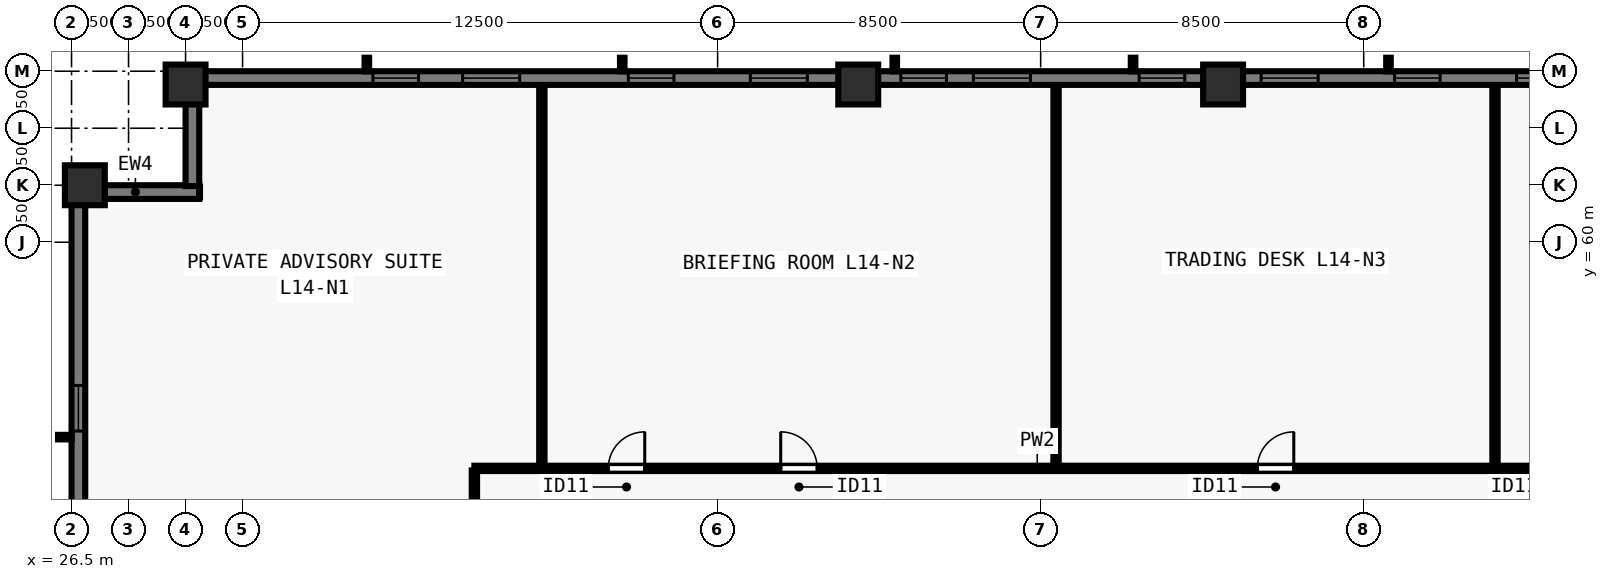
"""IFC4 building model, lengths in metres.
Left out: names, types, materials, properties, quantities, classifications, styles, units other than length and angle.
Written with IfcOpenShell. Run it as: python <this file> out.ifc"""

import sys

from ifc_helpers import new_model, si_unit, direction, frame, frame_2d, origin, origin_2d, place, context, subcontext, project, spatial, rectangle, extrude, element, fill, save


model = new_model("IFC4")
c1 = context("Model", 3, precision=1e-05, world=origin(), true_north=direction((0.0, 1.0)))
c2 = subcontext(c1, "Body", "Model", "MODEL_VIEW")
j1 = project(units=[si_unit("LENGTHUNIT", "METRE"), si_unit("PLANEANGLEUNIT", "RADIAN")], contexts=[c1])
p1 = place(None, origin())
s1 = spatial("IfcSite", under=j1, at=p1, CompositionType="ELEMENT")
p2 = place(p1, origin())
s2 = spatial("IfcBuilding", under=s1, at=p2, CompositionType="ELEMENT")
p3 = place(p2, frame((0.0, 0.0, 55.0)))
s3 = spatial("IfcBuildingStorey", under=s2, at=p3, CompositionType="ELEMENT", Elevation=55.0)
for number, where, z_axis, x_axis in (
    (1, (56.8, 64.15, 0.0), (0.0, 0.0, 1.0), (1.0, 0.0, 0.0)),
    (2, (47.2, 64.15, 0.0), (0.0, 0.0, 1.0), (1.0, 0.0, 0.0)),
    (3, (29.5, 64.15, 0.0), (0.0, 0.0, 1.0), (1.0, 0.0, 0.0)),
    (4, (26.85, 61.5, 0.0), (0.0, 0.0, 1.0), (0.0, 1.0, 0.0)),
):
    element("IfcColumn", number, at=place(p3, frame(where, z_axis=z_axis, x_axis=x_axis)), inside=s3, PredefinedType="COLUMN", context=c2, shape_type="SweptSolid", body=[
        extrude(rectangle(XDim=1.05, YDim=1.05, at=origin_2d()), origin(), (0.0, 0.0, 1.0), 3.5),
    ])
p4 = place(p3, frame((26.68, 16.5, 0.0), z_axis=(0.0, 0.0, 1.0), x_axis=(0.0, 1.0, 0.0)))
e5 = element("IfcWall", 5, at=p4, inside=s3, PredefinedType="SOLIDWALL", context=c2, shape_type="SweptSolid", body=[
    extrude(rectangle(XDim=44.662, YDim=0.36, at=frame_2d((22.331, 0.0))), origin(), (0.0, 0.0, 1.0), 3.28),
])
p5 = place(p4, frame((4.93, 0.0, 0.8)))
e6 = element("IfcOpeningElement", 6, at=p5, cuts=e5, PredefinedType="OPENING", context=c2, shape_type="SweptSolid", body=[
    extrude(rectangle(XDim=1.2, YDim=1.544, at=frame_2d((0.6, 0.772))), frame((0.0, 0.19, 0.0), z_axis=(0.0, -1.0, 0.0), x_axis=(1.0, 0.0, 0.0)), (0.0, 0.0, 1.0), 0.38),
])
p6 = place(p4, frame((8.14, 0.0, 0.8)))
e7 = element("IfcOpeningElement", 7, at=p6, cuts=e5, PredefinedType="OPENING", context=c2, shape_type="SweptSolid", body=[
    extrude(rectangle(XDim=1.5, YDim=1.544, at=frame_2d((0.75, 0.772))), frame((0.0, 0.19, 0.0), z_axis=(0.0, -1.0, 0.0), x_axis=(1.0, 0.0, 0.0)), (0.0, 0.0, 1.0), 0.38),
])
p7 = place(p4, frame((11.65, 0.0, 0.8)))
e8 = element("IfcOpeningElement", 8, at=p7, cuts=e5, PredefinedType="OPENING", context=c2, shape_type="SweptSolid", body=[
    extrude(rectangle(XDim=1.2, YDim=1.544, at=frame_2d((0.6, 0.772))), frame((0.0, 0.19, 0.0), z_axis=(0.0, -1.0, 0.0), x_axis=(1.0, 0.0, 0.0)), (0.0, 0.0, 1.0), 0.38),
])
p8 = place(p4, frame((14.861, 0.0, 0.8)))
e9 = element("IfcOpeningElement", 9, at=p8, cuts=e5, PredefinedType="OPENING", context=c2, shape_type="SweptSolid", body=[
    extrude(rectangle(XDim=1.5, YDim=1.544, at=frame_2d((0.75, 0.772))), frame((0.0, 0.19, 0.0), z_axis=(0.0, -1.0, 0.0), x_axis=(1.0, 0.0, 0.0)), (0.0, 0.0, 1.0), 0.38),
])
p9 = place(p4, frame((19.621, 0.0, 0.8)))
e10 = element("IfcOpeningElement", 10, at=p9, cuts=e5, PredefinedType="OPENING", context=c2, shape_type="SweptSolid", body=[
    extrude(rectangle(XDim=1.2, YDim=1.544, at=frame_2d((0.6, 0.772))), frame((0.0, 0.19, 0.0), z_axis=(0.0, -1.0, 0.0), x_axis=(1.0, 0.0, 0.0)), (0.0, 0.0, 1.0), 0.38),
])
p10 = place(p4, frame((21.581, 0.0, 0.8)))
e11 = element("IfcOpeningElement", 11, at=p10, cuts=e5, PredefinedType="OPENING", context=c2, shape_type="SweptSolid", body=[
    extrude(rectangle(XDim=1.5, YDim=1.544, at=frame_2d((0.75, 0.772))), frame((0.0, 0.19, 0.0), z_axis=(0.0, -1.0, 0.0), x_axis=(1.0, 0.0, 0.0)), (0.0, 0.0, 1.0), 0.38),
])
p11 = place(p4, frame((24.241, 0.0, 0.8)))
e12 = element("IfcOpeningElement", 12, at=p11, cuts=e5, PredefinedType="OPENING", context=c2, shape_type="SweptSolid", body=[
    extrude(rectangle(XDim=1.2, YDim=1.544, at=frame_2d((0.6, 0.772))), frame((0.0, 0.19, 0.0), z_axis=(0.0, -1.0, 0.0), x_axis=(1.0, 0.0, 0.0)), (0.0, 0.0, 1.0), 0.38),
])
p12 = place(p4, frame((28.302, 0.0, 0.8)))
e13 = element("IfcOpeningElement", 13, at=p12, cuts=e5, PredefinedType="OPENING", context=c2, shape_type="SweptSolid", body=[
    extrude(rectangle(XDim=1.5, YDim=1.544, at=frame_2d((0.75, 0.772))), frame((0.0, 0.19, 0.0), z_axis=(0.0, -1.0, 0.0), x_axis=(1.0, 0.0, 0.0)), (0.0, 0.0, 1.0), 0.38),
])
p13 = place(p4, frame((31.812, 0.0, 0.8)))
e14 = element("IfcOpeningElement", 14, at=p13, cuts=e5, PredefinedType="OPENING", context=c2, shape_type="SweptSolid", body=[
    extrude(rectangle(XDim=1.2, YDim=1.544, at=frame_2d((0.6, 0.772))), frame((0.0, 0.19, 0.0), z_axis=(0.0, -1.0, 0.0), x_axis=(1.0, 0.0, 0.0)), (0.0, 0.0, 1.0), 0.38),
])
p14 = place(p4, frame((35.022, 0.0, 0.8)))
e15 = element("IfcOpeningElement", 15, at=p14, cuts=e5, PredefinedType="OPENING", context=c2, shape_type="SweptSolid", body=[
    extrude(rectangle(XDim=1.5, YDim=1.544, at=frame_2d((0.75, 0.772))), frame((0.0, 0.19, 0.0), z_axis=(0.0, -1.0, 0.0), x_axis=(1.0, 0.0, 0.0)), (0.0, 0.0, 1.0), 0.38),
])
p15 = place(p4, frame((38.532, 0.0, 0.8)))
e16 = element("IfcOpeningElement", 16, at=p15, cuts=e5, PredefinedType="OPENING", context=c2, shape_type="SweptSolid", body=[
    extrude(rectangle(XDim=1.2, YDim=1.544, at=frame_2d((0.6, 0.772))), frame((0.0, 0.19, 0.0), z_axis=(0.0, -1.0, 0.0), x_axis=(1.0, 0.0, 0.0)), (0.0, 0.0, 1.0), 0.38),
])
p16 = place(p3, frame((26.5, 61.32, 0.0), z_axis=(0.0, 0.0, 1.0), x_axis=(1.0, 0.0, 0.0)))
e17 = element("IfcWall", 17, at=p16, inside=s3, PredefinedType="SOLIDWALL", context=c2, shape_type="SweptSolid", body=[
    extrude(rectangle(XDim=3.36, YDim=0.36, at=frame_2d((1.68, 0.0))), origin(), (0.0, 0.0, 1.0), 3.28),
])
p17 = place(p3, frame((29.68, 61.478, 0.0), z_axis=(0.0, 0.0, 1.0), x_axis=(0.0, 1.0, 0.0)))
e18 = element("IfcWall", 18, at=p17, inside=s3, PredefinedType="SOLIDWALL", context=c2, shape_type="SweptSolid", body=[
    extrude(rectangle(XDim=2.684, YDim=0.36, at=frame_2d((1.342, 0.0))), origin(), (0.0, 0.0, 1.0), 3.28),
])
p18 = place(p3, frame((29.5, 64.32, 0.0), z_axis=(0.0, 0.0, 1.0), x_axis=(1.0, 0.0, 0.0)))
e19 = element("IfcWall", 19, at=p18, inside=s3, PredefinedType="SOLIDWALL", context=c2, shape_type="SweptSolid", body=[
    extrude(rectangle(XDim=44.662, YDim=0.36, at=frame_2d((22.331, 0.0))), origin(), (0.0, 0.0, 1.0), 3.28),
])
p19 = place(p18, frame((4.93, 0.0, 0.8)))
e20 = element("IfcOpeningElement", 20, at=p19, cuts=e19, PredefinedType="OPENING", context=c2, shape_type="SweptSolid", body=[
    extrude(rectangle(XDim=1.2, YDim=1.544, at=frame_2d((0.6, 0.772))), frame((0.0, 0.19, 0.0), z_axis=(0.0, -1.0, 0.0), x_axis=(1.0, 0.0, 0.0)), (0.0, 0.0, 1.0), 0.38),
])
p20 = place(p18, frame((7.29, 0.0, 0.8)))
e21 = element("IfcOpeningElement", 21, at=p20, cuts=e19, PredefinedType="OPENING", context=c2, shape_type="SweptSolid", body=[
    extrude(rectangle(XDim=1.5, YDim=1.544, at=frame_2d((0.75, 0.772))), frame((0.0, 0.19, 0.0), z_axis=(0.0, -1.0, 0.0), x_axis=(1.0, 0.0, 0.0)), (0.0, 0.0, 1.0), 0.38),
])
p21 = place(p18, frame((11.65, 0.0, 0.8)))
e22 = element("IfcOpeningElement", 22, at=p21, cuts=e19, PredefinedType="OPENING", context=c2, shape_type="SweptSolid", body=[
    extrude(rectangle(XDim=1.2, YDim=1.544, at=frame_2d((0.6, 0.772))), frame((0.0, 0.19, 0.0), z_axis=(0.0, -1.0, 0.0), x_axis=(1.0, 0.0, 0.0)), (0.0, 0.0, 1.0), 0.38),
])
p22 = place(p18, frame((14.861, 0.0, 0.8)))
e23 = element("IfcOpeningElement", 23, at=p22, cuts=e19, PredefinedType="OPENING", context=c2, shape_type="SweptSolid", body=[
    extrude(rectangle(XDim=1.5, YDim=1.544, at=frame_2d((0.75, 0.772))), frame((0.0, 0.19, 0.0), z_axis=(0.0, -1.0, 0.0), x_axis=(1.0, 0.0, 0.0)), (0.0, 0.0, 1.0), 0.38),
])
p23 = place(p18, frame((18.821, 0.0, 0.8)))
e24 = element("IfcOpeningElement", 24, at=p23, cuts=e19, PredefinedType="OPENING", context=c2, shape_type="SweptSolid", body=[
    extrude(rectangle(XDim=1.2, YDim=1.544, at=frame_2d((0.6, 0.772))), frame((0.0, 0.19, 0.0), z_axis=(0.0, -1.0, 0.0), x_axis=(1.0, 0.0, 0.0)), (0.0, 0.0, 1.0), 0.38),
])
p24 = place(p18, frame((20.731, 0.0, 0.8)))
e25 = element("IfcOpeningElement", 25, at=p24, cuts=e19, PredefinedType="OPENING", context=c2, shape_type="SweptSolid", body=[
    extrude(rectangle(XDim=1.5, YDim=1.544, at=frame_2d((0.75, 0.772))), frame((0.0, 0.19, 0.0), z_axis=(0.0, -1.0, 0.0), x_axis=(1.0, 0.0, 0.0)), (0.0, 0.0, 1.0), 0.38),
])
p25 = place(p18, frame((25.091, 0.0, 0.8)))
e26 = element("IfcOpeningElement", 26, at=p25, cuts=e19, PredefinedType="OPENING", context=c2, shape_type="SweptSolid", body=[
    extrude(rectangle(XDim=1.2, YDim=1.544, at=frame_2d((0.6, 0.772))), frame((0.0, 0.19, 0.0), z_axis=(0.0, -1.0, 0.0), x_axis=(1.0, 0.0, 0.0)), (0.0, 0.0, 1.0), 0.38),
])
p26 = place(p18, frame((28.302, 0.0, 0.8)))
e27 = element("IfcOpeningElement", 27, at=p26, cuts=e19, PredefinedType="OPENING", context=c2, shape_type="SweptSolid", body=[
    extrude(rectangle(XDim=1.5, YDim=1.544, at=frame_2d((0.75, 0.772))), frame((0.0, 0.19, 0.0), z_axis=(0.0, -1.0, 0.0), x_axis=(1.0, 0.0, 0.0)), (0.0, 0.0, 1.0), 0.38),
])
p27 = place(p18, frame((31.812, 0.0, 0.8)))
e28 = element("IfcOpeningElement", 28, at=p27, cuts=e19, PredefinedType="OPENING", context=c2, shape_type="SweptSolid", body=[
    extrude(rectangle(XDim=1.2, YDim=1.544, at=frame_2d((0.6, 0.772))), frame((0.0, 0.19, 0.0), z_axis=(0.0, -1.0, 0.0), x_axis=(1.0, 0.0, 0.0)), (0.0, 0.0, 1.0), 0.38),
])
p28 = place(p18, frame((35.022, 0.0, 0.8)))
e29 = element("IfcOpeningElement", 29, at=p28, cuts=e19, PredefinedType="OPENING", context=c2, shape_type="SweptSolid", body=[
    extrude(rectangle(XDim=1.5, YDim=1.544, at=frame_2d((0.75, 0.772))), frame((0.0, 0.19, 0.0), z_axis=(0.0, -1.0, 0.0), x_axis=(1.0, 0.0, 0.0)), (0.0, 0.0, 1.0), 0.38),
])
p29 = place(p18, frame((38.532, 0.0, 0.8)))
e30 = element("IfcOpeningElement", 30, at=p29, cuts=e19, PredefinedType="OPENING", context=c2, shape_type="SweptSolid", body=[
    extrude(rectangle(XDim=1.2, YDim=1.544, at=frame_2d((0.6, 0.772))), frame((0.0, 0.19, 0.0), z_axis=(0.0, -1.0, 0.0), x_axis=(1.0, 0.0, 0.0)), (0.0, 0.0, 1.0), 0.38),
])
p30 = place(p3, frame((37.1, 54.05, 0.0), z_axis=(0.0, 0.0, 1.0), x_axis=(1.0, 0.0, 0.0)))
e31 = element("IfcWall", 31, at=p30, inside=s3, PredefinedType="PARTITIONING", context=c2, shape_type="SweptSolid", body=[
    extrude(rectangle(XDim=29.8, YDim=0.14, at=frame_2d((14.9, 0.0))), origin(), (0.0, 0.0, 1.0), 3.28),
])
p31 = place(p30, frame((3.522, 0.0, 0.0)))
e32 = element("IfcOpeningElement", 32, at=p31, cuts=e31, PredefinedType="OPENING", context=c2, shape_type="SweptSolid", body=[
    extrude(rectangle(XDim=0.96, YDim=2.12, at=frame_2d((0.48, 1.06))), frame((0.0, 0.08, 0.0), z_axis=(0.0, -1.0, 0.0), x_axis=(1.0, 0.0, 0.0)), (0.0, 0.0, 1.0), 0.16),
])
p32 = place(p30, frame((8.06, 0.0, 0.0)))
e33 = element("IfcOpeningElement", 33, at=p32, cuts=e31, PredefinedType="OPENING", context=c2, shape_type="SweptSolid", body=[
    extrude(rectangle(XDim=0.96, YDim=2.12, at=frame_2d((0.48, 1.06))), frame((0.0, 0.08, 0.0), z_axis=(0.0, -1.0, 0.0), x_axis=(1.0, 0.0, 0.0)), (0.0, 0.0, 1.0), 0.16),
])
p33 = place(p30, frame((20.6, 0.0, 0.0)))
e34 = element("IfcOpeningElement", 34, at=p33, cuts=e31, PredefinedType="OPENING", context=c2, shape_type="SweptSolid", body=[
    extrude(rectangle(XDim=0.96, YDim=2.12, at=frame_2d((0.48, 1.06))), frame((0.0, 0.08, 0.0), z_axis=(0.0, -1.0, 0.0), x_axis=(1.0, 0.0, 0.0)), (0.0, 0.0, 1.0), 0.16),
])
p34 = place(p30, frame((28.48, 0.0, 0.0)))
e35 = element("IfcOpeningElement", 35, at=p34, cuts=e31, PredefinedType="OPENING", context=c2, shape_type="SweptSolid", body=[
    extrude(rectangle(XDim=0.96, YDim=2.12, at=frame_2d((0.48, 1.06))), frame((0.0, 0.08, 0.0), z_axis=(0.0, -1.0, 0.0), x_axis=(1.0, 0.0, 0.0)), (0.0, 0.0, 1.0), 0.16),
])
p35 = place(p3, frame((37.1, 24.005, 0.0), z_axis=(0.0, 0.0, 1.0), x_axis=(0.0, 1.0, 0.0)))
e36 = element("IfcWall", 36, at=p35, inside=s3, PredefinedType="PARTITIONING", context=c2, shape_type="SweptSolid", body=[
    extrude(rectangle(XDim=29.99, YDim=0.14, at=frame_2d((14.995, 0.0))), origin(), (0.0, 0.0, 1.0), 3.28),
])
p36 = place(p35, frame((2.76, 0.0, 0.0)))
e37 = element("IfcOpeningElement", 37, at=p36, cuts=e36, PredefinedType="OPENING", context=c2, shape_type="SweptSolid", body=[
    extrude(rectangle(XDim=0.96, YDim=2.12, at=frame_2d((0.48, 1.06))), frame((0.0, 0.08, 0.0), z_axis=(0.0, -1.0, 0.0), x_axis=(1.0, 0.0, 0.0)), (0.0, 0.0, 1.0), 0.16),
])
p37 = place(p35, frame((8.598, 0.0, 0.0)))
e38 = element("IfcOpeningElement", 38, at=p37, cuts=e36, PredefinedType="OPENING", context=c2, shape_type="SweptSolid", body=[
    extrude(rectangle(XDim=0.96, YDim=2.12, at=frame_2d((0.48, 1.06))), frame((0.0, 0.08, 0.0), z_axis=(0.0, -1.0, 0.0), x_axis=(1.0, 0.0, 0.0)), (0.0, 0.0, 1.0), 0.16),
])
p38 = place(p35, frame((14.578, 0.0, 0.0)))
e39 = element("IfcOpeningElement", 39, at=p38, cuts=e36, PredefinedType="OPENING", context=c2, shape_type="SweptSolid", body=[
    extrude(rectangle(XDim=0.96, YDim=2.12, at=frame_2d((0.48, 1.06))), frame((0.0, 0.08, 0.0), z_axis=(0.0, -1.0, 0.0), x_axis=(1.0, 0.0, 0.0)), (0.0, 0.0, 1.0), 0.16),
])
p39 = place(p35, frame((20.558, 0.0, 0.0)))
e40 = element("IfcOpeningElement", 40, at=p39, cuts=e36, PredefinedType="OPENING", context=c2, shape_type="SweptSolid", body=[
    extrude(rectangle(XDim=0.96, YDim=2.12, at=frame_2d((0.48, 1.06))), frame((0.0, 0.08, 0.0), z_axis=(0.0, -1.0, 0.0), x_axis=(1.0, 0.0, 0.0)), (0.0, 0.0, 1.0), 0.16),
])
p40 = place(p35, frame((26.333, 0.0, 0.0)))
e41 = element("IfcOpeningElement", 41, at=p40, cuts=e36, PredefinedType="OPENING", context=c2, shape_type="SweptSolid", body=[
    extrude(rectangle(XDim=0.96, YDim=2.12, at=frame_2d((0.48, 1.06))), frame((0.0, 0.08, 0.0), z_axis=(0.0, -1.0, 0.0), x_axis=(1.0, 0.0, 0.0)), (0.0, 0.0, 1.0), 0.16),
])
p41 = place(p3, frame((38.875, 54.15, 0.0), z_axis=(0.0, 0.0, 1.0), x_axis=(0.0, 1.0, 0.0)))
e42 = element("IfcWall", 42, at=p41, inside=s3, PredefinedType="PARTITIONING", context=c2, shape_type="SweptSolid", body=[
    extrude(rectangle(XDim=9.93, YDim=0.14, at=frame_2d((4.965, 0.0))), origin(), (0.0, 0.0, 1.0), 3.28),
])
p42 = place(p3, frame((52.405, 54.15, 0.0), z_axis=(0.0, 0.0, 1.0), x_axis=(0.0, 1.0, 0.0)))
e43 = element("IfcWall", 43, at=p42, inside=s3, PredefinedType="PARTITIONING", context=c2, shape_type="SweptSolid", body=[
    extrude(rectangle(XDim=9.93, YDim=0.14, at=frame_2d((4.965, 0.0))), origin(), (0.0, 0.0, 1.0), 2.849),
])
p43 = place(p3, frame((63.955, 54.15, 0.0), z_axis=(0.0, 0.0, 1.0), x_axis=(0.0, 1.0, 0.0)))
e44 = element("IfcWall", 44, at=p43, inside=s3, PredefinedType="PARTITIONING", context=c2, shape_type="SweptSolid", body=[
    extrude(rectangle(XDim=9.93, YDim=0.14, at=frame_2d((4.965, 0.0))), origin(), (0.0, 0.0, 1.0), 3.28),
])
p44 = place(p15, origin())
e45 = element("IfcWindow", 45, at=p44, inside=s3, PartitioningType="SINGLE_PANEL", PredefinedType="WINDOW", context=c2, shape_type="SweptSolid", body=[
    extrude(rectangle(XDim=1.2, YDim=1.544, at=frame_2d((0.6, 0.772))), frame((0.0, -0.05, 0.0), z_axis=(0.0, -1.0, 0.0), x_axis=(1.0, 0.0, 0.0)), (0.0, 0.0, 1.0), 0.06),
])
fill(e16, e45)
p45 = place(p19, origin())
e46 = element("IfcWindow", 46, at=p45, inside=s3, PartitioningType="SINGLE_PANEL", PredefinedType="WINDOW", context=c2, shape_type="SweptSolid", body=[
    extrude(rectangle(XDim=1.2, YDim=1.544, at=frame_2d((0.6, 0.772))), frame((0.0, -0.05, 0.0), z_axis=(0.0, -1.0, 0.0), x_axis=(1.0, 0.0, 0.0)), (0.0, 0.0, 1.0), 0.06),
])
fill(e20, e46)
p46 = place(p20, origin())
e47 = element("IfcWindow", 47, at=p46, inside=s3, PartitioningType="SINGLE_PANEL", PredefinedType="WINDOW", context=c2, shape_type="SweptSolid", body=[
    extrude(rectangle(XDim=1.5, YDim=1.544, at=frame_2d((0.75, 0.772))), frame((0.0, -0.05, 0.0), z_axis=(0.0, -1.0, 0.0), x_axis=(1.0, 0.0, 0.0)), (0.0, 0.0, 1.0), 0.06),
])
fill(e21, e47)
p47 = place(p21, origin())
e48 = element("IfcWindow", 48, at=p47, inside=s3, PartitioningType="SINGLE_PANEL", PredefinedType="WINDOW", context=c2, shape_type="SweptSolid", body=[
    extrude(rectangle(XDim=1.2, YDim=1.544, at=frame_2d((0.6, 0.772))), frame((0.0, -0.05, 0.0), z_axis=(0.0, -1.0, 0.0), x_axis=(1.0, 0.0, 0.0)), (0.0, 0.0, 1.0), 0.06),
])
fill(e22, e48)
p48 = place(p22, origin())
e49 = element("IfcWindow", 49, at=p48, inside=s3, PartitioningType="SINGLE_PANEL", PredefinedType="WINDOW", context=c2, shape_type="SweptSolid", body=[
    extrude(rectangle(XDim=1.5, YDim=1.544, at=frame_2d((0.75, 0.772))), frame((0.0, -0.05, 0.0), z_axis=(0.0, -1.0, 0.0), x_axis=(1.0, 0.0, 0.0)), (0.0, 0.0, 1.0), 0.06),
])
fill(e23, e49)
p49 = place(p23, origin())
e50 = element("IfcWindow", 50, at=p49, inside=s3, PartitioningType="SINGLE_PANEL", PredefinedType="WINDOW", context=c2, shape_type="SweptSolid", body=[
    extrude(rectangle(XDim=1.2, YDim=1.544, at=frame_2d((0.6, 0.772))), frame((0.0, -0.05, 0.0), z_axis=(0.0, -1.0, 0.0), x_axis=(1.0, 0.0, 0.0)), (0.0, 0.0, 1.0), 0.06),
])
fill(e24, e50)
p50 = place(p24, origin())
e51 = element("IfcWindow", 51, at=p50, inside=s3, PartitioningType="SINGLE_PANEL", PredefinedType="WINDOW", context=c2, shape_type="SweptSolid", body=[
    extrude(rectangle(XDim=1.5, YDim=1.544, at=frame_2d((0.75, 0.772))), frame((0.0, -0.05, 0.0), z_axis=(0.0, -1.0, 0.0), x_axis=(1.0, 0.0, 0.0)), (0.0, 0.0, 1.0), 0.06),
])
fill(e25, e51)
p51 = place(p25, origin())
e52 = element("IfcWindow", 52, at=p51, inside=s3, PartitioningType="SINGLE_PANEL", PredefinedType="WINDOW", context=c2, shape_type="SweptSolid", body=[
    extrude(rectangle(XDim=1.2, YDim=1.544, at=frame_2d((0.6, 0.772))), frame((0.0, -0.05, 0.0), z_axis=(0.0, -1.0, 0.0), x_axis=(1.0, 0.0, 0.0)), (0.0, 0.0, 1.0), 0.06),
])
fill(e26, e52)
p52 = place(p26, origin())
e53 = element("IfcWindow", 53, at=p52, inside=s3, PartitioningType="SINGLE_PANEL", PredefinedType="WINDOW", context=c2, shape_type="SweptSolid", body=[
    extrude(rectangle(XDim=1.5, YDim=1.544, at=frame_2d((0.75, 0.772))), frame((0.0, -0.05, 0.0), z_axis=(0.0, -1.0, 0.0), x_axis=(1.0, 0.0, 0.0)), (0.0, 0.0, 1.0), 0.06),
])
fill(e27, e53)
p53 = place(p27, origin())
e54 = element("IfcWindow", 54, at=p53, inside=s3, PartitioningType="SINGLE_PANEL", PredefinedType="WINDOW", context=c2, shape_type="SweptSolid", body=[
    extrude(rectangle(XDim=1.2, YDim=1.544, at=frame_2d((0.6, 0.772))), frame((0.0, -0.05, 0.0), z_axis=(0.0, -1.0, 0.0), x_axis=(1.0, 0.0, 0.0)), (0.0, 0.0, 1.0), 0.06),
])
fill(e28, e54)
p54 = place(p28, origin())
e55 = element("IfcWindow", 55, at=p54, inside=s3, PartitioningType="SINGLE_PANEL", PredefinedType="WINDOW", context=c2, shape_type="SweptSolid", body=[
    extrude(rectangle(XDim=1.5, YDim=1.544, at=frame_2d((0.75, 0.772))), frame((0.0, -0.05, 0.0), z_axis=(0.0, -1.0, 0.0), x_axis=(1.0, 0.0, 0.0)), (0.0, 0.0, 1.0), 0.06),
])
fill(e29, e55)
p55 = place(p31, origin())
e56 = element("IfcDoor", 56, at=p55, inside=s3, OperationType="SINGLE_SWING_RIGHT", PredefinedType="DOOR", context=c2, shape_type="SweptSolid", body=[
    extrude(rectangle(XDim=0.96, YDim=2.12, at=frame_2d((0.48, 1.06))), frame((0.0, 0.025, 0.0), z_axis=(0.0, -1.0, 0.0), x_axis=(1.0, 0.0, 0.0)), (0.0, 0.0, 1.0), 0.05),
])
fill(e32, e56)
p56 = place(p32, origin())
e57 = element("IfcDoor", 57, at=p56, inside=s3, OperationType="SINGLE_SWING_LEFT", PredefinedType="DOOR", context=c2, shape_type="SweptSolid", body=[
    extrude(rectangle(XDim=0.96, YDim=2.12, at=frame_2d((0.48, 1.06))), frame((0.0, 0.025, 0.0), z_axis=(0.0, -1.0, 0.0), x_axis=(1.0, 0.0, 0.0)), (0.0, 0.0, 1.0), 0.05),
])
fill(e33, e57)
p57 = place(p33, origin())
e58 = element("IfcDoor", 58, at=p57, inside=s3, OperationType="SINGLE_SWING_RIGHT", PredefinedType="DOOR", context=c2, shape_type="SweptSolid", body=[
    extrude(rectangle(XDim=0.96, YDim=2.12, at=frame_2d((0.48, 1.06))), frame((0.0, 0.025, 0.0), z_axis=(0.0, -1.0, 0.0), x_axis=(1.0, 0.0, 0.0)), (0.0, 0.0, 1.0), 0.05),
])
fill(e34, e58)
save(model, sys.argv[1])
